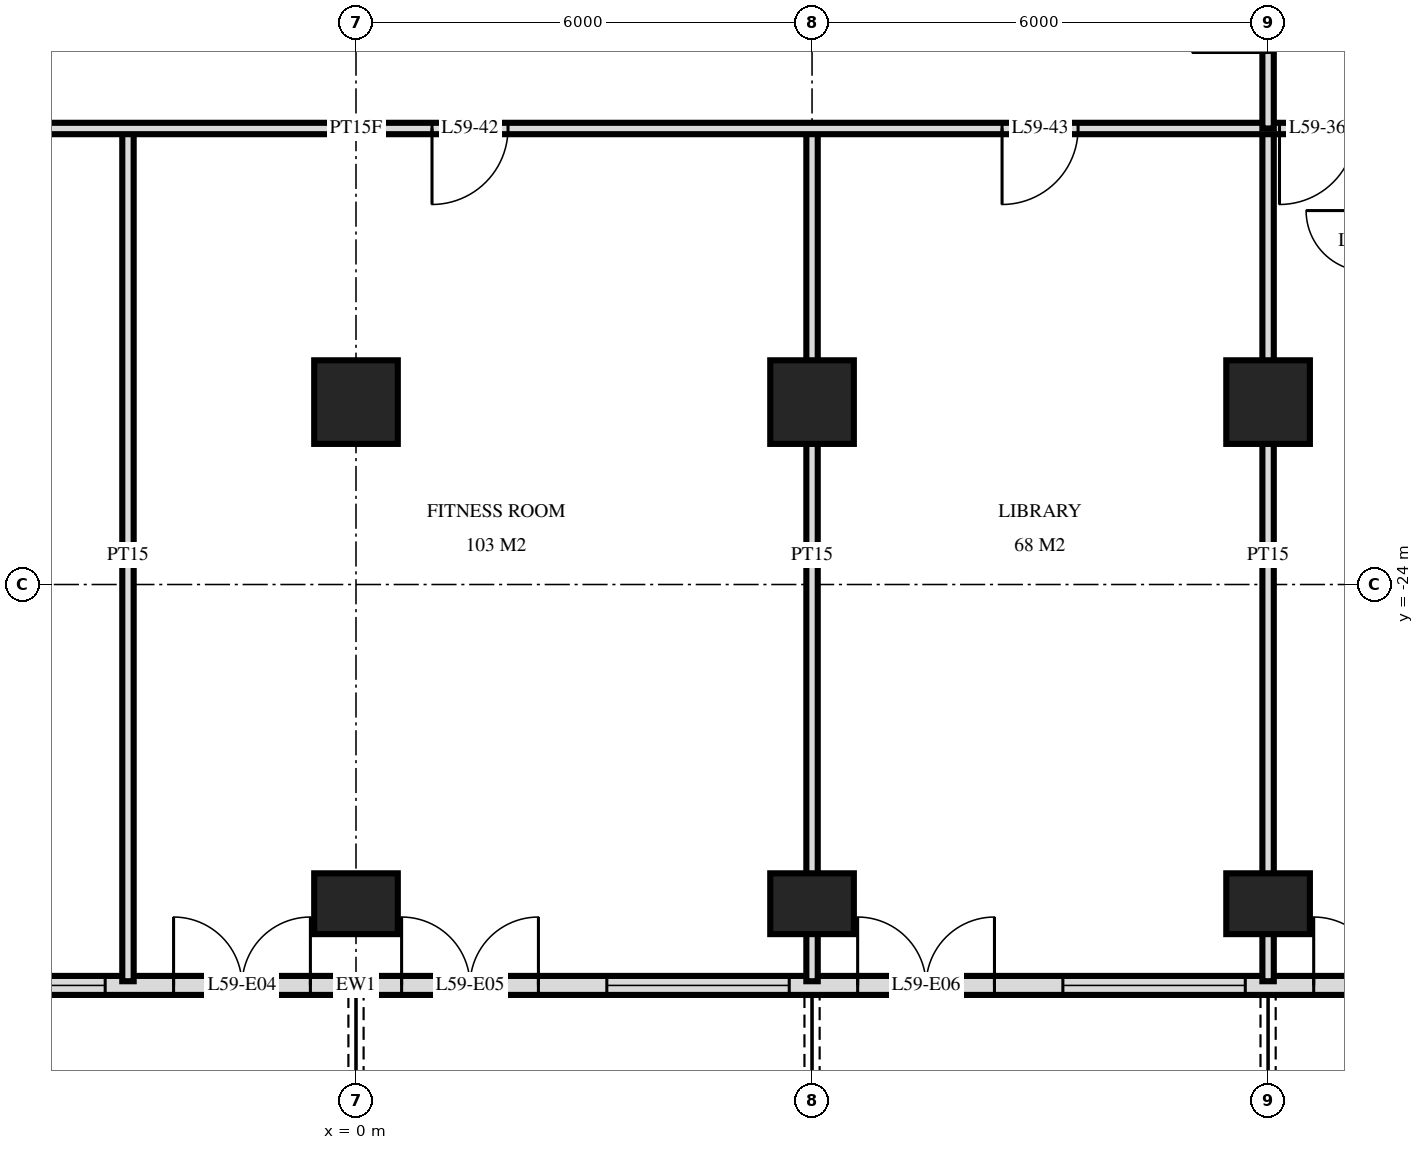
"""IFC4 building model, lengths in metres.
Left out: names, types, materials, properties, quantities, classifications, styles, units other than length and angle.
Written with IfcOpenShell. Run it as: python <this file> out.ifc"""

import sys

from ifc_helpers import new_model, si_unit, direction, frame, frame_2d, origin, origin_2d, place, context, subcontext, project, spatial, rectangle, extrude, element, fill, save


model = new_model("IFC4")
c1 = context("Model", 3, precision=1e-05, world=origin(), true_north=direction((0.0, 1.0)))
c2 = subcontext(c1, "Body", "Model", "MODEL_VIEW")
j1 = project(units=[si_unit("LENGTHUNIT", "METRE"), si_unit("PLANEANGLEUNIT", "RADIAN")], contexts=[c1])
p1 = place(None, origin())
s1 = spatial("IfcSite", under=j1, at=p1, CompositionType="ELEMENT")
p2 = place(p1, origin())
s2 = spatial("IfcBuilding", under=s1, at=p2, CompositionType="ELEMENT")
p3 = place(p2, frame((0.0, 0.0, 225.6)))
s3 = spatial("IfcBuildingStorey", under=s2, at=p3, CompositionType="ELEMENT", Elevation=225.6)
p4 = place(p3, frame((0.0, -28.2, 0.0), z_axis=(0.0, 0.0, 1.0), x_axis=(1.0, 0.0, 0.0)))
e1 = element("IfcColumn", 1, at=p4, inside=s3, PredefinedType="COLUMN", context=c2, shape_type="SweptSolid", body=[
    extrude(rectangle(XDim=1.1, YDim=0.8, at=origin_2d()), origin(), (0.0, 0.0, 1.0), 3.5),
])
p5 = place(p3, frame((0.0, -21.6, 0.0), z_axis=(0.0, 0.0, 1.0), x_axis=(1.0, 0.0, 0.0)))
e2 = element("IfcColumn", 2, at=p5, inside=s3, PredefinedType="COLUMN", context=c2, shape_type="SweptSolid", body=[
    extrude(rectangle(XDim=1.1, YDim=1.1, at=origin_2d()), origin(), (0.0, 0.0, 1.0), 3.5),
])
p6 = place(p3, frame((6.0, -28.2, 0.0), z_axis=(0.0, 0.0, 1.0), x_axis=(1.0, 0.0, 0.0)))
e3 = element("IfcColumn", 3, at=p6, inside=s3, PredefinedType="COLUMN", context=c2, shape_type="SweptSolid", body=[
    extrude(rectangle(XDim=1.1, YDim=0.8, at=origin_2d()), origin(), (0.0, 0.0, 1.0), 3.5),
])
p7 = place(p3, frame((6.0, -21.6, 0.0), z_axis=(0.0, 0.0, 1.0), x_axis=(1.0, 0.0, 0.0)))
e4 = element("IfcColumn", 4, at=p7, inside=s3, PredefinedType="COLUMN", context=c2, shape_type="SweptSolid", body=[
    extrude(rectangle(XDim=1.1, YDim=1.1, at=origin_2d()), origin(), (0.0, 0.0, 1.0), 3.5),
])
p8 = place(p3, frame((12.0, -28.2, 0.0), z_axis=(0.0, 0.0, 1.0), x_axis=(1.0, 0.0, 0.0)))
e5 = element("IfcColumn", 5, at=p8, inside=s3, PredefinedType="COLUMN", context=c2, shape_type="SweptSolid", body=[
    extrude(rectangle(XDim=1.1, YDim=0.8, at=origin_2d()), origin(), (0.0, 0.0, 1.0), 3.5),
])
p9 = place(p3, frame((12.0, -21.6, 0.0), z_axis=(0.0, 0.0, 1.0), x_axis=(1.0, 0.0, 0.0)))
e6 = element("IfcColumn", 6, at=p9, inside=s3, PredefinedType="COLUMN", context=c2, shape_type="SweptSolid", body=[
    extrude(rectangle(XDim=1.1, YDim=1.1, at=origin_2d()), origin(), (0.0, 0.0, 1.0), 3.5),
])
p10 = place(p3, frame((-22.475, -29.275, 0.0), z_axis=(0.0, 0.0, 1.0), x_axis=(1.0, 0.0, 0.0)))
e7 = element("IfcWall", 7, at=p10, inside=s3, PredefinedType="SOLIDWALL", context=c2, shape_type="SweptSolid", body=[
    extrude(rectangle(XDim=44.951, YDim=0.25, at=frame_2d((22.475, 0.0))), origin(), (0.0, 0.0, 1.0), 3.22),
])
p11 = place(p10, frame((0.575, 0.0, 0.0)))
e8 = element("IfcOpeningElement", 8, at=p11, cuts=e7, PredefinedType="OPENING", context=c2, shape_type="SweptSolid", body=[
    extrude(rectangle(XDim=1.8, YDim=2.4, at=frame_2d((0.9, 1.2))), frame((0.0, 0.135, 0.0), z_axis=(0.0, -1.0, 0.0), x_axis=(1.0, 0.0, 0.0)), (0.0, 0.0, 1.0), 0.27),
])
p12 = place(p10, frame((8.075, 0.0, 0.0)))
e9 = element("IfcOpeningElement", 9, at=p12, cuts=e7, PredefinedType="OPENING", context=c2, shape_type="SweptSolid", body=[
    extrude(rectangle(XDim=1.8, YDim=2.4, at=frame_2d((0.9, 1.2))), frame((0.0, 0.135, 0.0), z_axis=(0.0, -1.0, 0.0), x_axis=(1.0, 0.0, 0.0)), (0.0, 0.0, 1.0), 0.27),
])
p13 = place(p10, frame((11.075, 0.0, 0.0)))
e10 = element("IfcOpeningElement", 10, at=p13, cuts=e7, PredefinedType="OPENING", context=c2, shape_type="SweptSolid", body=[
    extrude(rectangle(XDim=1.8, YDim=2.4, at=frame_2d((0.9, 1.2))), frame((0.0, 0.135, 0.0), z_axis=(0.0, -1.0, 0.0), x_axis=(1.0, 0.0, 0.0)), (0.0, 0.0, 1.0), 0.27),
])
p14 = place(p10, frame((13.775, 0.0, 0.9)))
e11 = element("IfcOpeningElement", 11, at=p14, cuts=e7, PredefinedType="OPENING", context=c2, shape_type="SweptSolid", body=[
    extrude(rectangle(XDim=2.4, YDim=1.5, at=frame_2d((1.2, 0.75))), frame((0.0, 0.135, 0.0), z_axis=(0.0, -1.0, 0.0), x_axis=(1.0, 0.0, 0.0)), (0.0, 0.0, 1.0), 0.27),
])
p15 = place(p10, frame((16.775, 0.0, 0.9)))
e12 = element("IfcOpeningElement", 12, at=p15, cuts=e7, PredefinedType="OPENING", context=c2, shape_type="SweptSolid", body=[
    extrude(rectangle(XDim=2.4, YDim=1.5, at=frame_2d((1.2, 0.75))), frame((0.0, 0.135, 0.0), z_axis=(0.0, -1.0, 0.0), x_axis=(1.0, 0.0, 0.0)), (0.0, 0.0, 1.0), 0.27),
])
p16 = place(p10, frame((20.075, 0.0, 0.0)))
e13 = element("IfcOpeningElement", 13, at=p16, cuts=e7, PredefinedType="OPENING", context=c2, shape_type="SweptSolid", body=[
    extrude(rectangle(XDim=1.8, YDim=2.4, at=frame_2d((0.9, 1.2))), frame((0.0, 0.135, 0.0), z_axis=(0.0, -1.0, 0.0), x_axis=(1.0, 0.0, 0.0)), (0.0, 0.0, 1.0), 0.27),
])
p17 = place(p10, frame((23.075, 0.0, 0.0)))
e14 = element("IfcOpeningElement", 14, at=p17, cuts=e7, PredefinedType="OPENING", context=c2, shape_type="SweptSolid", body=[
    extrude(rectangle(XDim=1.8, YDim=2.4, at=frame_2d((0.9, 1.2))), frame((0.0, 0.135, 0.0), z_axis=(0.0, -1.0, 0.0), x_axis=(1.0, 0.0, 0.0)), (0.0, 0.0, 1.0), 0.27),
])
p18 = place(p10, frame((25.775, 0.0, 0.9)))
e15 = element("IfcOpeningElement", 15, at=p18, cuts=e7, PredefinedType="OPENING", context=c2, shape_type="SweptSolid", body=[
    extrude(rectangle(XDim=2.4, YDim=1.5, at=frame_2d((1.2, 0.75))), frame((0.0, 0.135, 0.0), z_axis=(0.0, -1.0, 0.0), x_axis=(1.0, 0.0, 0.0)), (0.0, 0.0, 1.0), 0.27),
])
p19 = place(p10, frame((29.075, 0.0, 0.0)))
e16 = element("IfcOpeningElement", 16, at=p19, cuts=e7, PredefinedType="OPENING", context=c2, shape_type="SweptSolid", body=[
    extrude(rectangle(XDim=1.8, YDim=2.4, at=frame_2d((0.9, 1.2))), frame((0.0, 0.135, 0.0), z_axis=(0.0, -1.0, 0.0), x_axis=(1.0, 0.0, 0.0)), (0.0, 0.0, 1.0), 0.27),
])
p20 = place(p10, frame((31.775, 0.0, 0.9)))
e17 = element("IfcOpeningElement", 17, at=p20, cuts=e7, PredefinedType="OPENING", context=c2, shape_type="SweptSolid", body=[
    extrude(rectangle(XDim=2.4, YDim=1.5, at=frame_2d((1.2, 0.75))), frame((0.0, 0.135, 0.0), z_axis=(0.0, -1.0, 0.0), x_axis=(1.0, 0.0, 0.0)), (0.0, 0.0, 1.0), 0.27),
])
p21 = place(p10, frame((35.075, 0.0, 0.0)))
e18 = element("IfcOpeningElement", 18, at=p21, cuts=e7, PredefinedType="OPENING", context=c2, shape_type="SweptSolid", body=[
    extrude(rectangle(XDim=1.8, YDim=2.4, at=frame_2d((0.9, 1.2))), frame((0.0, 0.135, 0.0), z_axis=(0.0, -1.0, 0.0), x_axis=(1.0, 0.0, 0.0)), (0.0, 0.0, 1.0), 0.27),
])
p22 = place(p10, frame((37.775, 0.0, 0.9)))
e19 = element("IfcOpeningElement", 19, at=p22, cuts=e7, PredefinedType="OPENING", context=c2, shape_type="SweptSolid", body=[
    extrude(rectangle(XDim=2.4, YDim=1.5, at=frame_2d((1.2, 0.75))), frame((0.0, 0.135, 0.0), z_axis=(0.0, -1.0, 0.0), x_axis=(1.0, 0.0, 0.0)), (0.0, 0.0, 1.0), 0.27),
])
p23 = place(p10, frame((41.075, 0.0, 0.0)))
e20 = element("IfcOpeningElement", 20, at=p23, cuts=e7, PredefinedType="OPENING", context=c2, shape_type="SweptSolid", body=[
    extrude(rectangle(XDim=1.8, YDim=2.4, at=frame_2d((0.9, 1.2))), frame((0.0, 0.135, 0.0), z_axis=(0.0, -1.0, 0.0), x_axis=(1.0, 0.0, 0.0)), (0.0, 0.0, 1.0), 0.27),
])
p24 = place(p3, frame((12.0, -18.0, 0.0), z_axis=(0.0, 0.0, 1.0), x_axis=(0.0, 1.0, 0.0)))
e21 = element("IfcWall", 21, at=p24, inside=s3, PredefinedType="PARTITIONING", context=c2, shape_type="SweptSolid", body=[
    extrude(rectangle(XDim=2.95, YDim=0.15, at=frame_2d((1.475, 0.0))), origin(), (0.0, 0.0, 1.0), 3.22),
])
p25 = place(p24, frame((1.0, 0.0, 0.0)))
e22 = element("IfcOpeningElement", 22, at=p25, cuts=e21, PredefinedType="OPENING", context=c2, shape_type="SweptSolid", body=[
    extrude(rectangle(XDim=1.0, YDim=2.1, at=frame_2d((0.5, 1.05))), frame((0.0, 0.085, 0.0), z_axis=(0.0, -1.0, 0.0), x_axis=(1.0, 0.0, 0.0)), (0.0, 0.0, 1.0), 0.17),
])
for number, where, z_axis, x_axis in (
    (23, (12.0, -29.22, 0.0), (0.0, 0.0, 1.0), (0.0, 1.0, 0.0)),
    (24, (6.0, -29.22, 0.0), (0.0, 0.0, 1.0), (0.0, 1.0, 0.0)),
    (25, (-3.0, -29.22, 0.0), (0.0, 0.0, 1.0), (0.0, 1.0, 0.0)),
):
    element("IfcWall", number, at=place(p3, frame(where, z_axis=z_axis, x_axis=x_axis)), inside=s3, PredefinedType="PARTITIONING", context=c2, shape_type="SweptSolid", body=[
        extrude(rectangle(XDim=11.22, YDim=0.15, at=frame_2d((5.61, 0.0))), origin(), (0.0, 0.0, 1.0), 3.22),
    ])
p26 = place(p3, frame((-26.82, -18.0, 0.0), z_axis=(0.0, 0.0, 1.0), x_axis=(1.0, 0.0, 0.0)))
e26 = element("IfcWall", 26, at=p26, inside=s3, PredefinedType="PARTITIONING", context=c2, shape_type="SweptSolid", body=[
    extrude(rectangle(XDim=53.64, YDim=0.15, at=frame_2d((26.82, 0.0))), origin(), (0.0, 0.0, 1.0), 3.22),
])
p27 = place(p26, frame((4.92, 0.0, 0.0)))
e27 = element("IfcOpeningElement", 27, at=p27, cuts=e26, PredefinedType="OPENING", context=c2, shape_type="SweptSolid", body=[
    extrude(rectangle(XDim=1.0, YDim=2.1, at=frame_2d((0.5, 1.05))), frame((0.0, 0.085, 0.0), z_axis=(0.0, -1.0, 0.0), x_axis=(1.0, 0.0, 0.0)), (0.0, 0.0, 1.0), 0.17),
])
p28 = place(p26, frame((1.62, 0.0, 0.0)))
e28 = element("IfcOpeningElement", 28, at=p28, cuts=e26, PredefinedType="OPENING", context=c2, shape_type="SweptSolid", body=[
    extrude(rectangle(XDim=1.0, YDim=2.1, at=frame_2d((0.5, 1.05))), frame((0.0, 0.085, 0.0), z_axis=(0.0, -1.0, 0.0), x_axis=(1.0, 0.0, 0.0)), (0.0, 0.0, 1.0), 0.17),
])
p29 = place(p26, frame((38.97, 0.0, 0.0)))
e29 = element("IfcOpeningElement", 29, at=p29, cuts=e26, PredefinedType="OPENING", context=c2, shape_type="SweptSolid", body=[
    extrude(rectangle(XDim=1.0, YDim=2.1, at=frame_2d((0.5, 1.05))), frame((0.0, 0.085, 0.0), z_axis=(0.0, -1.0, 0.0), x_axis=(1.0, 0.0, 0.0)), (0.0, 0.0, 1.0), 0.17),
])
p30 = place(p26, frame((48.72, 0.0, 0.0)))
e30 = element("IfcOpeningElement", 30, at=p30, cuts=e26, PredefinedType="OPENING", context=c2, shape_type="SweptSolid", body=[
    extrude(rectangle(XDim=1.0, YDim=2.1, at=frame_2d((0.5, 1.05))), frame((0.0, 0.085, 0.0), z_axis=(0.0, -1.0, 0.0), x_axis=(1.0, 0.0, 0.0)), (0.0, 0.0, 1.0), 0.17),
])
p31 = place(p26, frame((46.92, 0.0, 0.0)))
e31 = element("IfcOpeningElement", 31, at=p31, cuts=e26, PredefinedType="OPENING", context=c2, shape_type="SweptSolid", body=[
    extrude(rectangle(XDim=1.0, YDim=2.1, at=frame_2d((0.5, 1.05))), frame((0.0, 0.085, 0.0), z_axis=(0.0, -1.0, 0.0), x_axis=(1.0, 0.0, 0.0)), (0.0, 0.0, 1.0), 0.17),
])
p32 = place(p26, frame((18.82, 0.0, 0.0)))
e32 = element("IfcOpeningElement", 32, at=p32, cuts=e26, PredefinedType="OPENING", context=c2, shape_type="SweptSolid", body=[
    extrude(rectangle(XDim=1.0, YDim=2.1, at=frame_2d((0.5, 1.05))), frame((0.0, 0.085, 0.0), z_axis=(0.0, -1.0, 0.0), x_axis=(1.0, 0.0, 0.0)), (0.0, 0.0, 1.0), 0.17),
])
p33 = place(p26, frame((27.82, 0.0, 0.0)))
e33 = element("IfcOpeningElement", 33, at=p33, cuts=e26, PredefinedType="OPENING", context=c2, shape_type="SweptSolid", body=[
    extrude(rectangle(XDim=1.0, YDim=2.1, at=frame_2d((0.5, 1.05))), frame((0.0, 0.085, 0.0), z_axis=(0.0, -1.0, 0.0), x_axis=(1.0, 0.0, 0.0)), (0.0, 0.0, 1.0), 0.17),
])
p34 = place(p26, frame((35.32, 0.0, 0.0)))
e34 = element("IfcOpeningElement", 34, at=p34, cuts=e26, PredefinedType="OPENING", context=c2, shape_type="SweptSolid", body=[
    extrude(rectangle(XDim=1.0, YDim=2.1, at=frame_2d((0.5, 1.05))), frame((0.0, 0.085, 0.0), z_axis=(0.0, -1.0, 0.0), x_axis=(1.0, 0.0, 0.0)), (0.0, 0.0, 1.0), 0.17),
])
p35 = place(p15, origin())
e35 = element("IfcWindow", 35, at=p35, inside=s3, PartitioningType="SINGLE_PANEL", PredefinedType="WINDOW", context=c2, shape_type="SweptSolid", body=[
    extrude(rectangle(XDim=2.4, YDim=1.5, at=frame_2d((1.2, 0.75))), frame((0.0, 0.03, 0.0), z_axis=(0.0, -1.0, 0.0), x_axis=(1.0, 0.0, 0.0)), (0.0, 0.0, 1.0), 0.06),
])
fill(e12, e35)
p36 = place(p16, origin())
e36 = element("IfcDoor", 36, at=p36, inside=s3, OperationType="DOUBLE_DOOR_SINGLE_SWING", PredefinedType="DOOR", context=c2, shape_type="SweptSolid", body=[
    extrude(rectangle(XDim=1.8, YDim=2.4, at=frame_2d((0.9, 1.2))), frame((0.0, 0.025, 0.0), z_axis=(0.0, -1.0, 0.0), x_axis=(1.0, 0.0, 0.0)), (0.0, 0.0, 1.0), 0.05),
])
fill(e13, e36)
p37 = place(p17, origin())
e37 = element("IfcDoor", 37, at=p37, inside=s3, OperationType="DOUBLE_DOOR_SINGLE_SWING", PredefinedType="DOOR", context=c2, shape_type="SweptSolid", body=[
    extrude(rectangle(XDim=1.8, YDim=2.4, at=frame_2d((0.9, 1.2))), frame((0.0, 0.025, 0.0), z_axis=(0.0, -1.0, 0.0), x_axis=(1.0, 0.0, 0.0)), (0.0, 0.0, 1.0), 0.05),
])
fill(e14, e37)
p38 = place(p18, origin())
e38 = element("IfcWindow", 38, at=p38, inside=s3, PartitioningType="SINGLE_PANEL", PredefinedType="WINDOW", context=c2, shape_type="SweptSolid", body=[
    extrude(rectangle(XDim=2.4, YDim=1.5, at=frame_2d((1.2, 0.75))), frame((0.0, 0.03, 0.0), z_axis=(0.0, -1.0, 0.0), x_axis=(1.0, 0.0, 0.0)), (0.0, 0.0, 1.0), 0.06),
])
fill(e15, e38)
p39 = place(p19, origin())
e39 = element("IfcDoor", 39, at=p39, inside=s3, OperationType="DOUBLE_DOOR_SINGLE_SWING", PredefinedType="DOOR", context=c2, shape_type="SweptSolid", body=[
    extrude(rectangle(XDim=1.8, YDim=2.4, at=frame_2d((0.9, 1.2))), frame((0.0, 0.025, 0.0), z_axis=(0.0, -1.0, 0.0), x_axis=(1.0, 0.0, 0.0)), (0.0, 0.0, 1.0), 0.05),
])
fill(e16, e39)
p40 = place(p20, origin())
e40 = element("IfcWindow", 40, at=p40, inside=s3, PartitioningType="SINGLE_PANEL", PredefinedType="WINDOW", context=c2, shape_type="SweptSolid", body=[
    extrude(rectangle(XDim=2.4, YDim=1.5, at=frame_2d((1.2, 0.75))), frame((0.0, 0.03, 0.0), z_axis=(0.0, -1.0, 0.0), x_axis=(1.0, 0.0, 0.0)), (0.0, 0.0, 1.0), 0.06),
])
fill(e17, e40)
p41 = place(p21, origin())
e41 = element("IfcDoor", 41, at=p41, inside=s3, OperationType="DOUBLE_DOOR_SINGLE_SWING", PredefinedType="DOOR", context=c2, shape_type="SweptSolid", body=[
    extrude(rectangle(XDim=1.8, YDim=2.4, at=frame_2d((0.9, 1.2))), frame((0.0, 0.025, 0.0), z_axis=(0.0, -1.0, 0.0), x_axis=(1.0, 0.0, 0.0)), (0.0, 0.0, 1.0), 0.05),
])
fill(e18, e41)
p42 = place(p29, frame((0.5, 0.0, 0.0), z_axis=(0.0, 0.0, 1.0), x_axis=(-1.0, 0.0, 0.0)))
e42 = element("IfcDoor", 42, at=p42, inside=s3, OperationType="SINGLE_SWING_LEFT", PredefinedType="DOOR", context=c2, shape_type="SweptSolid", body=[
    extrude(rectangle(XDim=1.0, YDim=2.1, at=frame_2d((0.0, 1.05))), frame((0.0, -0.025, 0.0), z_axis=(0.0, 1.0, 0.0), x_axis=(-1.0, 0.0, 0.0)), (0.0, 0.0, 1.0), 0.05),
])
fill(e29, e42)
p43 = place(p33, frame((0.5, 0.0, 0.0), z_axis=(0.0, 0.0, 1.0), x_axis=(-1.0, 0.0, 0.0)))
e43 = element("IfcDoor", 43, at=p43, inside=s3, OperationType="SINGLE_SWING_LEFT", PredefinedType="DOOR", context=c2, shape_type="SweptSolid", body=[
    extrude(rectangle(XDim=1.0, YDim=2.1, at=frame_2d((0.0, 1.05))), frame((0.0, -0.025, 0.0), z_axis=(0.0, 1.0, 0.0), x_axis=(-1.0, 0.0, 0.0)), (0.0, 0.0, 1.0), 0.05),
])
fill(e33, e43)
p44 = place(p34, frame((0.5, 0.0, 0.0), z_axis=(0.0, 0.0, 1.0), x_axis=(-1.0, 0.0, 0.0)))
e44 = element("IfcDoor", 44, at=p44, inside=s3, OperationType="SINGLE_SWING_LEFT", PredefinedType="DOOR", context=c2, shape_type="SweptSolid", body=[
    extrude(rectangle(XDim=1.0, YDim=2.1, at=frame_2d((0.0, 1.05))), frame((0.0, -0.025, 0.0), z_axis=(0.0, 1.0, 0.0), x_axis=(-1.0, 0.0, 0.0)), (0.0, 0.0, 1.0), 0.05),
])
fill(e34, e44)
save(model, sys.argv[1])
